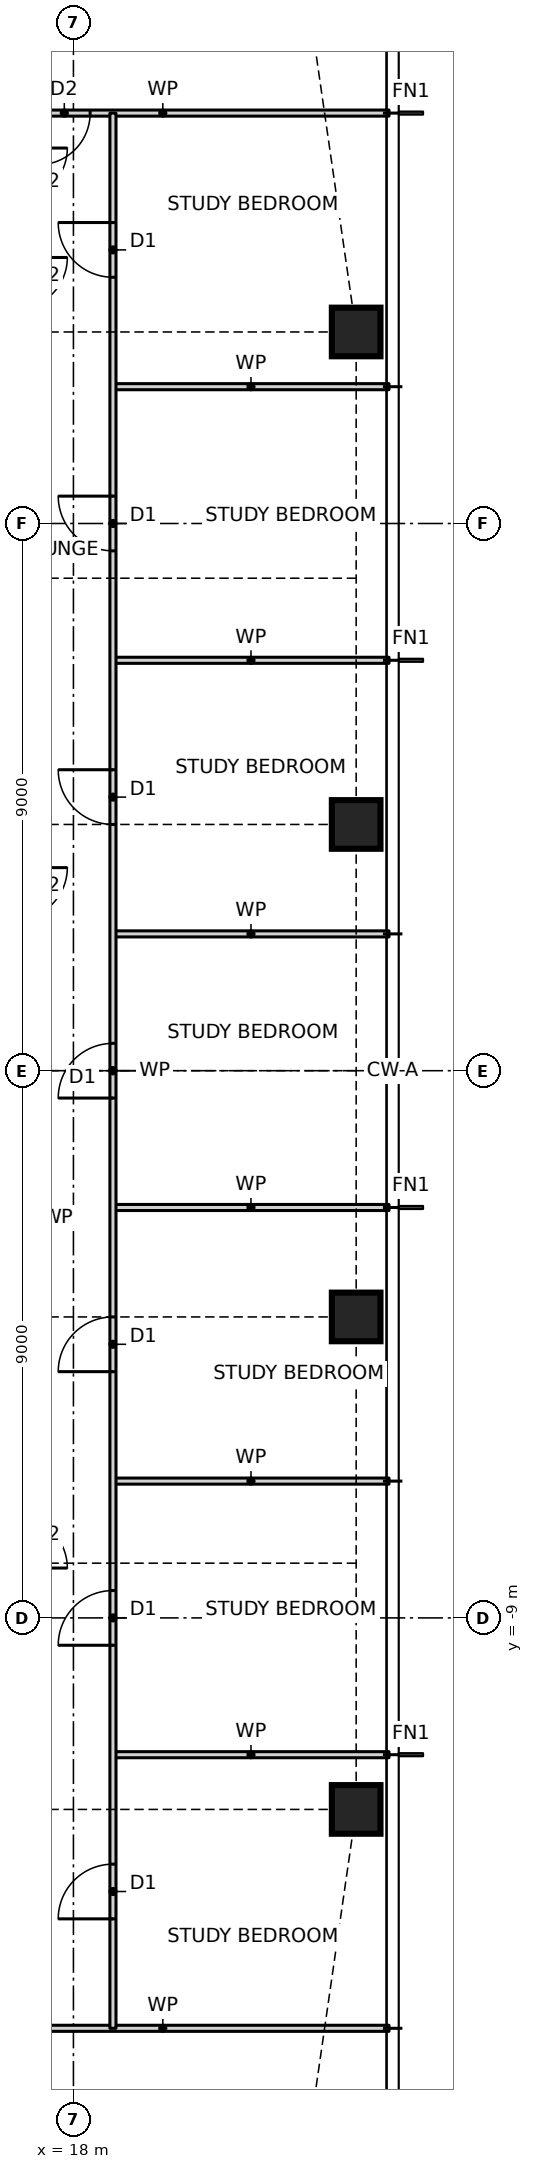
"""IFC4 building model, lengths in metres.
Left out: names, types, materials, properties, quantities, classifications, styles, units other than length and angle.
Written with IfcOpenShell. Run it as: python <this file> out.ifc"""

import sys

from ifc_helpers import new_model, si_unit, direction, frame, frame_2d, origin, origin_2d, place, context, subcontext, project, spatial, rectangle, hollow_rectangle, extrude, element, fill, save


model = new_model("IFC4")
c1 = context("Model", 3, precision=1e-05, world=origin(), true_north=direction((0.0, 1.0)))
c2 = subcontext(c1, "Body", "Model", "MODEL_VIEW")
j1 = project(units=[si_unit("LENGTHUNIT", "METRE"), si_unit("PLANEANGLEUNIT", "RADIAN")], contexts=[c1])
p1 = place(None, origin())
s1 = spatial("IfcSite", under=j1, at=p1, CompositionType="ELEMENT")
p2 = place(p1, origin())
s2 = spatial("IfcBuilding", under=s1, at=p2, CompositionType="ELEMENT")
p3 = place(p2, frame((0.0, 0.0, 46.5)))
s3 = spatial("IfcBuildingStorey", under=s2, at=p3, CompositionType="ELEMENT", Elevation=46.5)
for number, where, z_axis, x_axis in (
    (1, (22.65, -12.15, 0.0), (0.0, 0.0, 1.0), (1.0, 0.0, 0.0)),
    (2, (22.65, -4.05, 0.0), (0.0, 0.0, 1.0), (1.0, 0.0, 0.0)),
    (3, (22.65, 4.05, 0.0), (0.0, 0.0, 1.0), (1.0, 0.0, 0.0)),
    (4, (22.65, 12.15, 0.0), (0.0, 0.0, 1.0), (1.0, 0.0, 0.0)),
):
    element("IfcColumn", number, at=place(p3, frame(where, z_axis=z_axis, x_axis=x_axis)), inside=s3, PredefinedType="COLUMN", context=c2, shape_type="SweptSolid", body=[
        extrude(hollow_rectangle(XDim=0.8, YDim=0.8, WallThickness=0.09, at=origin_2d()), origin(), (0.0, 0.0, 1.0), 3.5),
    ])
p4 = place(p3, frame((15.75, -15.75, 0.0), z_axis=(0.0, 0.0, 1.0), x_axis=(1.0, 0.0, 0.0)))
e5 = element("IfcWall", 5, at=p4, inside=s3, PredefinedType="PARTITIONING", context=c2, shape_type="SweptSolid", body=[
    extrude(rectangle(XDim=7.44, YDim=0.1, at=frame_2d((3.72, 0.0))), origin(), (0.0, 0.0, 1.0), 3.27),
])
for number, where, z_axis, x_axis in (
    (6, (18.65, -11.25, 0.0), (0.0, 0.0, 1.0), (1.0, 0.0, 0.0)),
    (7, (18.65, -6.75, 0.0), (0.0, 0.0, 1.0), (1.0, 0.0, 0.0)),
    (8, (18.65, -2.25, 0.0), (0.0, 0.0, 1.0), (1.0, 0.0, 0.0)),
    (9, (18.65, 2.25, 0.0), (0.0, 0.0, 1.0), (1.0, 0.0, 0.0)),
    (10, (18.65, 6.75, 0.0), (0.0, 0.0, 1.0), (1.0, 0.0, 0.0)),
    (11, (18.65, 11.25, 0.0), (0.0, 0.0, 1.0), (1.0, 0.0, 0.0)),
):
    element("IfcWall", number, at=place(p3, frame(where, z_axis=z_axis, x_axis=x_axis)), inside=s3, PredefinedType="PARTITIONING", context=c2, shape_type="SweptSolid", body=[
        extrude(rectangle(XDim=4.54, YDim=0.1, at=frame_2d((2.27, 0.0))), origin(), (0.0, 0.0, 1.0), 3.27),
    ])
p5 = place(p3, frame((15.75, 15.75, 0.0), z_axis=(0.0, 0.0, 1.0), x_axis=(1.0, 0.0, 0.0)))
e12 = element("IfcWall", 12, at=p5, inside=s3, PredefinedType="PARTITIONING", context=c2, shape_type="SweptSolid", body=[
    extrude(rectangle(XDim=7.44, YDim=0.1, at=frame_2d((3.72, 0.0))), origin(), (0.0, 0.0, 1.0), 3.27),
])
p6 = place(p5, frame((1.675, 0.0, 0.0)))
e13 = element("IfcOpeningElement", 13, at=p6, cuts=e12, PredefinedType="OPENING", context=c2, shape_type="SweptSolid", body=[
    extrude(rectangle(XDim=0.85, YDim=2.1, at=frame_2d((0.425, 1.05))), frame((0.0, 0.06, 0.0), z_axis=(0.0, -1.0, 0.0), x_axis=(1.0, 0.0, 0.0)), (0.0, 0.0, 1.0), 0.12),
])
p7 = place(p3, frame((18.65, -15.75, 0.0), z_axis=(0.0, 0.0, 1.0), x_axis=(0.0, 1.0, 0.0)))
e14 = element("IfcWall", 14, at=p7, inside=s3, PredefinedType="PARTITIONING", context=c2, shape_type="SweptSolid", body=[
    extrude(rectangle(XDim=31.5, YDim=0.1, at=frame_2d((15.75, 0.0))), origin(), (0.0, 0.0, 1.0), 3.27),
])
p8 = place(p7, frame((1.8, 0.0, 0.0)))
e15 = element("IfcOpeningElement", 15, at=p8, cuts=e14, PredefinedType="OPENING", context=c2, shape_type="SweptSolid", body=[
    extrude(rectangle(XDim=0.9, YDim=2.1, at=frame_2d((0.45, 1.05))), frame((0.0, 0.06, 0.0), z_axis=(0.0, -1.0, 0.0), x_axis=(1.0, 0.0, 0.0)), (0.0, 0.0, 1.0), 0.12),
])
p9 = place(p7, frame((6.3, 0.0, 0.0)))
e16 = element("IfcOpeningElement", 16, at=p9, cuts=e14, PredefinedType="OPENING", context=c2, shape_type="SweptSolid", body=[
    extrude(rectangle(XDim=0.9, YDim=2.1, at=frame_2d((0.45, 1.05))), frame((0.0, 0.06, 0.0), z_axis=(0.0, -1.0, 0.0), x_axis=(1.0, 0.0, 0.0)), (0.0, 0.0, 1.0), 0.12),
])
p10 = place(p7, frame((10.8, 0.0, 0.0)))
e17 = element("IfcOpeningElement", 17, at=p10, cuts=e14, PredefinedType="OPENING", context=c2, shape_type="SweptSolid", body=[
    extrude(rectangle(XDim=0.9, YDim=2.1, at=frame_2d((0.45, 1.05))), frame((0.0, 0.06, 0.0), z_axis=(0.0, -1.0, 0.0), x_axis=(1.0, 0.0, 0.0)), (0.0, 0.0, 1.0), 0.12),
])
p11 = place(p7, frame((15.3, 0.0, 0.0)))
e18 = element("IfcOpeningElement", 18, at=p11, cuts=e14, PredefinedType="OPENING", context=c2, shape_type="SweptSolid", body=[
    extrude(rectangle(XDim=0.9, YDim=2.1, at=frame_2d((0.45, 1.05))), frame((0.0, 0.06, 0.0), z_axis=(0.0, -1.0, 0.0), x_axis=(1.0, 0.0, 0.0)), (0.0, 0.0, 1.0), 0.12),
])
p12 = place(p7, frame((19.8, 0.0, 0.0)))
e19 = element("IfcOpeningElement", 19, at=p12, cuts=e14, PredefinedType="OPENING", context=c2, shape_type="SweptSolid", body=[
    extrude(rectangle(XDim=0.9, YDim=2.1, at=frame_2d((0.45, 1.05))), frame((0.0, 0.06, 0.0), z_axis=(0.0, -1.0, 0.0), x_axis=(1.0, 0.0, 0.0)), (0.0, 0.0, 1.0), 0.12),
])
p13 = place(p7, frame((24.3, 0.0, 0.0)))
e20 = element("IfcOpeningElement", 20, at=p13, cuts=e14, PredefinedType="OPENING", context=c2, shape_type="SweptSolid", body=[
    extrude(rectangle(XDim=0.9, YDim=2.1, at=frame_2d((0.45, 1.05))), frame((0.0, 0.06, 0.0), z_axis=(0.0, -1.0, 0.0), x_axis=(1.0, 0.0, 0.0)), (0.0, 0.0, 1.0), 0.12),
])
p14 = place(p7, frame((28.8, 0.0, 0.0)))
e21 = element("IfcOpeningElement", 21, at=p14, cuts=e14, PredefinedType="OPENING", context=c2, shape_type="SweptSolid", body=[
    extrude(rectangle(XDim=0.9, YDim=2.1, at=frame_2d((0.45, 1.05))), frame((0.0, 0.06, 0.0), z_axis=(0.0, -1.0, 0.0), x_axis=(1.0, 0.0, 0.0)), (0.0, 0.0, 1.0), 0.12),
])
p15 = place(p8, origin())
e22 = element("IfcDoor", 22, at=p15, inside=s3, OperationType="SINGLE_SWING_LEFT", PredefinedType="DOOR", context=c2, shape_type="SweptSolid", body=[
    extrude(rectangle(XDim=0.9, YDim=2.1, at=frame_2d((0.45, 1.05))), frame((0.0, 0.025, 0.0), z_axis=(0.0, -1.0, 0.0), x_axis=(1.0, 0.0, 0.0)), (0.0, 0.0, 1.0), 0.05),
])
fill(e15, e22)
p16 = place(p9, origin())
e23 = element("IfcDoor", 23, at=p16, inside=s3, OperationType="SINGLE_SWING_LEFT", PredefinedType="DOOR", context=c2, shape_type="SweptSolid", body=[
    extrude(rectangle(XDim=0.9, YDim=2.1, at=frame_2d((0.45, 1.05))), frame((0.0, 0.025, 0.0), z_axis=(0.0, -1.0, 0.0), x_axis=(1.0, 0.0, 0.0)), (0.0, 0.0, 1.0), 0.05),
])
fill(e16, e23)
p17 = place(p10, origin())
e24 = element("IfcDoor", 24, at=p17, inside=s3, OperationType="SINGLE_SWING_LEFT", PredefinedType="DOOR", context=c2, shape_type="SweptSolid", body=[
    extrude(rectangle(XDim=0.9, YDim=2.1, at=frame_2d((0.45, 1.05))), frame((0.0, 0.025, 0.0), z_axis=(0.0, -1.0, 0.0), x_axis=(1.0, 0.0, 0.0)), (0.0, 0.0, 1.0), 0.05),
])
fill(e17, e24)
p18 = place(p11, origin())
e25 = element("IfcDoor", 25, at=p18, inside=s3, OperationType="SINGLE_SWING_LEFT", PredefinedType="DOOR", context=c2, shape_type="SweptSolid", body=[
    extrude(rectangle(XDim=0.9, YDim=2.1, at=frame_2d((0.45, 1.05))), frame((0.0, 0.025, 0.0), z_axis=(0.0, -1.0, 0.0), x_axis=(1.0, 0.0, 0.0)), (0.0, 0.0, 1.0), 0.05),
])
fill(e18, e25)
p19 = place(p12, origin())
e26 = element("IfcDoor", 26, at=p19, inside=s3, OperationType="SINGLE_SWING_RIGHT", PredefinedType="DOOR", context=c2, shape_type="SweptSolid", body=[
    extrude(rectangle(XDim=0.9, YDim=2.1, at=frame_2d((0.45, 1.05))), frame((0.0, 0.025, 0.0), z_axis=(0.0, -1.0, 0.0), x_axis=(1.0, 0.0, 0.0)), (0.0, 0.0, 1.0), 0.05),
])
fill(e19, e26)
p20 = place(p13, origin())
e27 = element("IfcDoor", 27, at=p20, inside=s3, OperationType="SINGLE_SWING_RIGHT", PredefinedType="DOOR", context=c2, shape_type="SweptSolid", body=[
    extrude(rectangle(XDim=0.9, YDim=2.1, at=frame_2d((0.45, 1.05))), frame((0.0, 0.025, 0.0), z_axis=(0.0, -1.0, 0.0), x_axis=(1.0, 0.0, 0.0)), (0.0, 0.0, 1.0), 0.05),
])
fill(e20, e27)
p21 = place(p14, origin())
e28 = element("IfcDoor", 28, at=p21, inside=s3, OperationType="SINGLE_SWING_RIGHT", PredefinedType="DOOR", context=c2, shape_type="SweptSolid", body=[
    extrude(rectangle(XDim=0.9, YDim=2.1, at=frame_2d((0.45, 1.05))), frame((0.0, 0.025, 0.0), z_axis=(0.0, -1.0, 0.0), x_axis=(1.0, 0.0, 0.0)), (0.0, 0.0, 1.0), 0.05),
])
fill(e21, e28)
p22 = place(p6, frame((0.85, 0.0, 0.0), z_axis=(0.0, 0.0, 1.0), x_axis=(-1.0, 0.0, 0.0)))
e29 = element("IfcDoor", 29, at=p22, inside=s3, OperationType="SINGLE_SWING_RIGHT", PredefinedType="DOOR", context=c2, shape_type="SweptSolid", body=[
    extrude(rectangle(XDim=0.85, YDim=2.1, at=frame_2d((0.425, 1.05))), frame((0.0, 0.025, 0.0), z_axis=(0.0, -1.0, 0.0), x_axis=(1.0, 0.0, 0.0)), (0.0, 0.0, 1.0), 0.05),
])
fill(e13, e29)
save(model, sys.argv[1])
